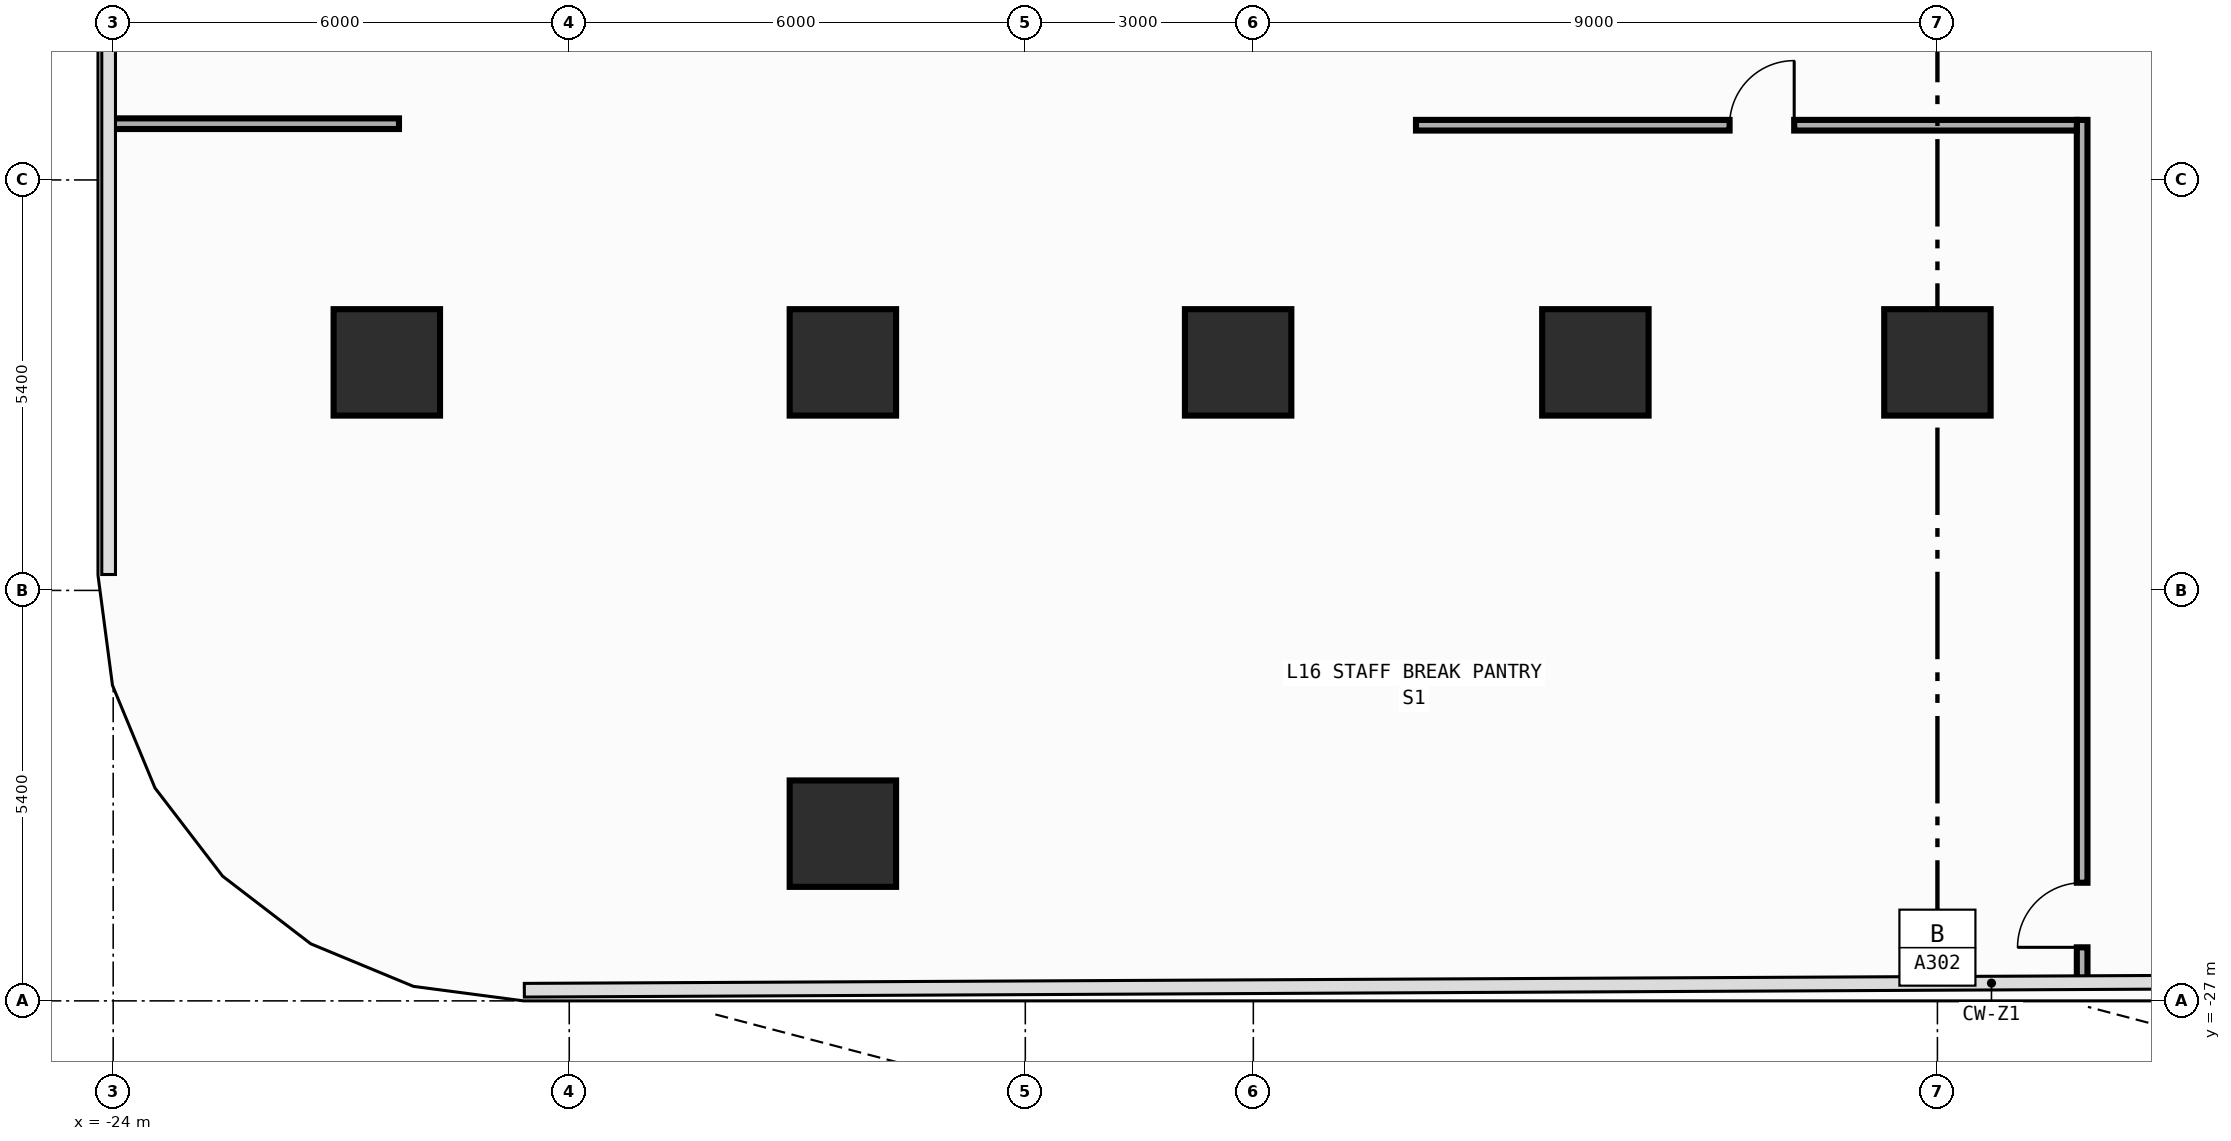
"""IFC4 building model, lengths in metres.
Left out: names, types, materials, properties, quantities, classifications, styles, units other than length and angle.
Written with IfcOpenShell. Run it as: python <this file> out.ifc"""

import sys

from ifc_helpers import new_model, si_unit, direction, frame, frame_2d, origin, origin_2d, place, context, subcontext, project, spatial, rectangle, extrude, element, fill, save


model = new_model("IFC4")
c1 = context("Model", 3, precision=1e-05, world=origin(), true_north=direction((0.0, 1.0)))
c2 = subcontext(c1, "Body", "Model", "MODEL_VIEW")
j1 = project(units=[si_unit("LENGTHUNIT", "METRE"), si_unit("PLANEANGLEUNIT", "RADIAN")], contexts=[c1])
p1 = place(None, origin())
s1 = spatial("IfcSite", under=j1, at=p1, CompositionType="ELEMENT")
p2 = place(p1, origin())
s2 = spatial("IfcBuilding", under=s1, at=p2, CompositionType="ELEMENT")
p3 = place(p2, frame((0.0, 0.0, 68.0)))
s3 = spatial("IfcBuildingStorey", under=s2, at=p3, CompositionType="ELEMENT", Elevation=68.0)
for number, where, z_axis, x_axis in (
    (1, (-9.2, -18.6, 0.0), (0.0, 0.0, 1.0), (1.0, 0.0, 0.0)),
    (2, (-20.4, -18.6, 0.0), (0.0, 0.0, 1.0), (1.0, 0.0, 0.0)),
    (3, (-14.4, -18.6, 0.0), (0.0, 0.0, 1.0), (1.0, 0.0, 0.0)),
    (4, (-4.5, -18.6, 0.0), (0.0, 0.0, 1.0), (1.0, 0.0, 0.0)),
    (5, (0.0, -18.6, 0.0), (0.0, 0.0, 1.0), (1.0, 0.0, 0.0)),
    (6, (-14.4, -24.8, 0.0), (0.0, 0.0, 1.0), (1.0, 0.0, 0.0)),
):
    element("IfcColumn", number, at=place(p3, frame(where, z_axis=z_axis, x_axis=x_axis)), inside=s3, PredefinedType="COLUMN", context=c2, shape_type="SweptSolid", body=[
        extrude(rectangle(XDim=1.4, YDim=1.4, at=origin_2d()), origin(), (0.0, 0.0, 1.0), 4.2),
    ])
p4 = place(p3, frame((-24.055, -15.46, 0.0), z_axis=(0.0, 0.0, 1.0), x_axis=(1.0, 0.0, 0.0)))
e7 = element("IfcWall", 7, at=p4, inside=s3, PredefinedType="PARTITIONING", context=c2, shape_type="SweptSolid", body=[
    extrude(rectangle(XDim=3.815, YDim=0.14, at=frame_2d((1.907, 0.0))), origin(), (0.0, 0.0, 1.0), 3.94),
])
p5 = place(p3, frame((1.904, -26.756, 0.0), z_axis=(0.0, 0.0, 1.0), x_axis=(0.0, 1.0, 0.0)))
e8 = element("IfcWall", 8, at=p5, inside=s3, PredefinedType="PARTITIONING", context=c2, shape_type="SweptSolid", body=[
    extrude(rectangle(XDim=11.346, YDim=0.14, at=frame_2d((5.673, 0.0))), origin(), (0.0, 0.0, 1.0), 3.94),
])
p6 = place(p5, frame((0.46, 0.0, 0.0)))
e9 = element("IfcOpeningElement", 9, at=p6, cuts=e8, PredefinedType="OPENING", context=c2, shape_type="SweptSolid", body=[
    extrude(rectangle(XDim=0.85, YDim=2.1, at=frame_2d((0.425, 1.05))), frame((0.0, 0.08, 0.0), z_axis=(0.0, -1.0, 0.0), x_axis=(1.0, 0.0, 0.0)), (0.0, 0.0, 1.0), 0.16),
])
p7 = place(p3, frame((-6.86, -15.48, 0.0), z_axis=(0.0, 0.0, 1.0), x_axis=(1.0, 0.0, 0.0)))
e10 = element("IfcWall", 10, at=p7, inside=s3, PredefinedType="PARTITIONING", context=c2, shape_type="SweptSolid", body=[
    extrude(rectangle(XDim=8.694, YDim=0.14, at=frame_2d((4.347, 0.0))), origin(), (0.0, 0.0, 1.0), 3.94),
])
p8 = place(p7, frame((4.125, 0.0, 0.0)))
e11 = element("IfcOpeningElement", 11, at=p8, cuts=e10, PredefinedType="OPENING", context=c2, shape_type="SweptSolid", body=[
    extrude(rectangle(XDim=0.85, YDim=2.1, at=frame_2d((0.425, 1.05))), frame((0.0, 0.08, 0.0), z_axis=(0.0, -1.0, 0.0), x_axis=(1.0, 0.0, 0.0)), (0.0, 0.0, 1.0), 0.16),
])
p9 = place(p8, origin())
e12 = element("IfcDoor", 12, at=p9, inside=s3, OperationType="SINGLE_SWING_RIGHT", PredefinedType="DOOR", context=c2, shape_type="SweptSolid", body=[
    extrude(rectangle(XDim=0.85, YDim=2.1, at=frame_2d((0.425, 1.05))), frame((0.0, 0.025, 0.0), z_axis=(0.0, -1.0, 0.0), x_axis=(1.0, 0.0, 0.0)), (0.0, 0.0, 1.0), 0.05),
])
fill(e11, e12)
p10 = place(p6, origin())
e13 = element("IfcDoor", 13, at=p10, inside=s3, OperationType="SINGLE_SWING_LEFT", PredefinedType="DOOR", context=c2, shape_type="SweptSolid", body=[
    extrude(rectangle(XDim=0.85, YDim=2.1, at=frame_2d((0.425, 1.05))), frame((0.0, 0.025, 0.0), z_axis=(0.0, -1.0, 0.0), x_axis=(1.0, 0.0, 0.0)), (0.0, 0.0, 1.0), 0.05),
])
fill(e9, e13)
save(model, sys.argv[1])
